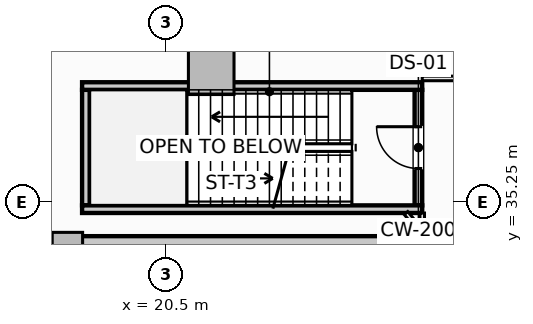
"""IFC4 building model, lengths in metres.
Left out: names, types, materials, properties, quantities, classifications, styles, units other than length and angle.
Written with IfcOpenShell. Run it as: python <this file> out.ifc"""

import sys

from ifc_helpers import new_model, si_unit, direction, frame, frame_2d, origin, origin_2d, place, context, subcontext, project, spatial, rectangle, extrude, element, fill, save


model = new_model("IFC4")
c1 = context("Model", 3, precision=1e-05, world=origin(), true_north=direction((0.0, 1.0)))
c2 = subcontext(c1, "Body", "Model", "MODEL_VIEW")
j1 = project(units=[si_unit("LENGTHUNIT", "METRE"), si_unit("PLANEANGLEUNIT", "RADIAN")], contexts=[c1])
p1 = place(None, origin())
s1 = spatial("IfcSite", under=j1, at=p1, CompositionType="ELEMENT")
p2 = place(p1, origin())
s2 = spatial("IfcBuilding", under=s1, at=p2, CompositionType="ELEMENT")
p3 = place(p2, frame((0.0, 0.0, 10.0)))
s3 = spatial("IfcBuildingStorey", under=s2, at=p3, CompositionType="ELEMENT", Elevation=10.0)
p4 = place(p3, frame((14.075, 33.925, -0.26), z_axis=(0.0, 0.0, 1.0), x_axis=(1.0, 0.0, 0.0)))
e1 = element("IfcWall", 1, at=p4, inside=s3, PredefinedType="SHEAR", context=c2, shape_type="SweptSolid", body=[
    extrude(rectangle(XDim=13.85, YDim=0.85, at=frame_2d((6.925, 0.0))), origin(), (0.0, 0.0, 1.0), 5.02),
])
p5 = place(p3, frame((21.698, 38.677, -0.26), z_axis=(0.0, 0.0, 1.0), x_axis=(1.0, 0.0, 0.0)))
e2 = element("IfcColumn", 2, at=p5, inside=s3, PredefinedType="COLUMN", context=c2, shape_type="SweptSolid", body=[
    extrude(rectangle(XDim=1.2, YDim=1.2, at=origin_2d()), origin(), (0.0, 0.0, 1.0), 5.02),
])
p6 = place(p3, frame((17.914, 34.05, -0.26), z_axis=(0.0, 0.0, 1.0), x_axis=(1.0, 0.0, 0.0)))
e3 = element("IfcColumn", 3, at=p6, inside=s3, PredefinedType="PILASTER", context=c2, shape_type="SweptSolid", body=[
    extrude(rectangle(XDim=0.8, YDim=0.8, at=origin_2d()), origin(), (0.0, 0.0, 1.0), 5.02),
])
p7 = place(p3, frame((27.15, 35.16, -0.26), z_axis=(0.0, 0.0, 1.0), x_axis=(0.0, 1.0, 0.0)))
e4 = element("IfcWall", 4, at=p7, inside=s3, PredefinedType="SHEAR", context=c2, shape_type="SweptSolid", body=[
    extrude(rectangle(XDim=3.04, YDim=0.2, at=frame_2d((1.52, 0.0))), origin(), (0.0, 0.0, 1.0), 5.02),
])
p8 = place(p7, frame((0.97, 0.0, 0.26)))
e5 = element("IfcOpeningElement", 5, at=p8, cuts=e4, PredefinedType="OPENING", context=c2, shape_type="SweptSolid", body=[
    extrude(rectangle(XDim=1.1, YDim=2.15, at=frame_2d((0.55, 1.075))), frame((0.0, 0.11, 0.0), z_axis=(0.0, -1.0, 0.0), x_axis=(1.0, 0.0, 0.0)), (0.0, 0.0, 1.0), 0.22),
])
p9 = place(p3, frame((18.4, 35.16, -0.26), z_axis=(0.0, 0.0, 1.0), x_axis=(0.0, 1.0, 0.0)))
e6 = element("IfcWall", 6, at=p9, inside=s3, PredefinedType="SHEAR", context=c2, shape_type="SweptSolid", body=[
    extrude(rectangle(XDim=3.04, YDim=0.2, at=frame_2d((1.52, 0.0))), origin(), (0.0, 0.0, 1.0), 5.02),
])
for number, where, z_axis, x_axis in (
    (7, (18.3, 38.3, -0.26), (0.0, 0.0, 1.0), (1.0, 0.0, 0.0)),
    (8, (18.3, 35.06, -0.26), (0.0, 0.0, 1.0), (1.0, 0.0, 0.0)),
):
    element("IfcWall", number, at=place(p3, frame(where, z_axis=z_axis, x_axis=x_axis)), inside=s3, PredefinedType="SHEAR", context=c2, shape_type="SweptSolid", body=[
        extrude(rectangle(XDim=8.95, YDim=0.2, at=frame_2d((4.475, 0.0))), origin(), (0.0, 0.0, 1.0), 5.02),
    ])
p10 = place(p3, frame((27.25, 34.352, 0.0), z_axis=(0.0, 0.0, 1.0), x_axis=(0.0, 1.0, 0.0)))
e9 = element("IfcWall", 9, at=p10, inside=s3, PredefinedType="PARTITIONING", context=c2, shape_type="SweptSolid", body=[
    extrude(rectangle(XDim=0.606, YDim=0.12, at=frame_2d((0.303, 0.0))), origin(), (0.0, 0.0, 1.0), 4.76),
])
p11 = place(p3, frame((27.25, 38.5, 0.0), z_axis=(0.0, 0.0, 1.0), x_axis=(1.0, 0.0, 0.0)))
e10 = element("IfcWall", 10, at=p11, inside=s3, PredefinedType="PARTITIONING", context=c2, shape_type="SweptSolid", body=[
    extrude(rectangle(XDim=2.53, YDim=0.12, at=frame_2d((1.265, 0.0))), origin(), (0.0, 0.0, 1.0), 4.76),
])
p12 = place(p3, frame((26.823, 34.958, 0.0), z_axis=(0.0, 0.0, 1.0), x_axis=(0.642124432794, -0.766600425782, 0.0)))
e11 = element("IfcWall", 11, at=p12, inside=s3, PredefinedType="PARTITIONING", context=c2, shape_type="SweptSolid", body=[
    extrude(rectangle(XDim=0.569, YDim=0.12, at=frame_2d((0.284, 0.0))), origin(), (0.0, 0.0, 1.0), 4.76),
])
p13 = place(p8, origin())
e12 = element("IfcDoor", 12, at=p13, inside=s3, OperationType="SINGLE_SWING_RIGHT", PredefinedType="DOOR", context=c2, shape_type="SweptSolid", body=[
    extrude(rectangle(XDim=1.1, YDim=2.15, at=frame_2d((0.55, 1.075))), frame((0.0, 0.025, 0.0), z_axis=(0.0, -1.0, 0.0), x_axis=(1.0, 0.0, 0.0)), (0.0, 0.0, 1.0), 0.05),
])
fill(e5, e12)
save(model, sys.argv[1])
